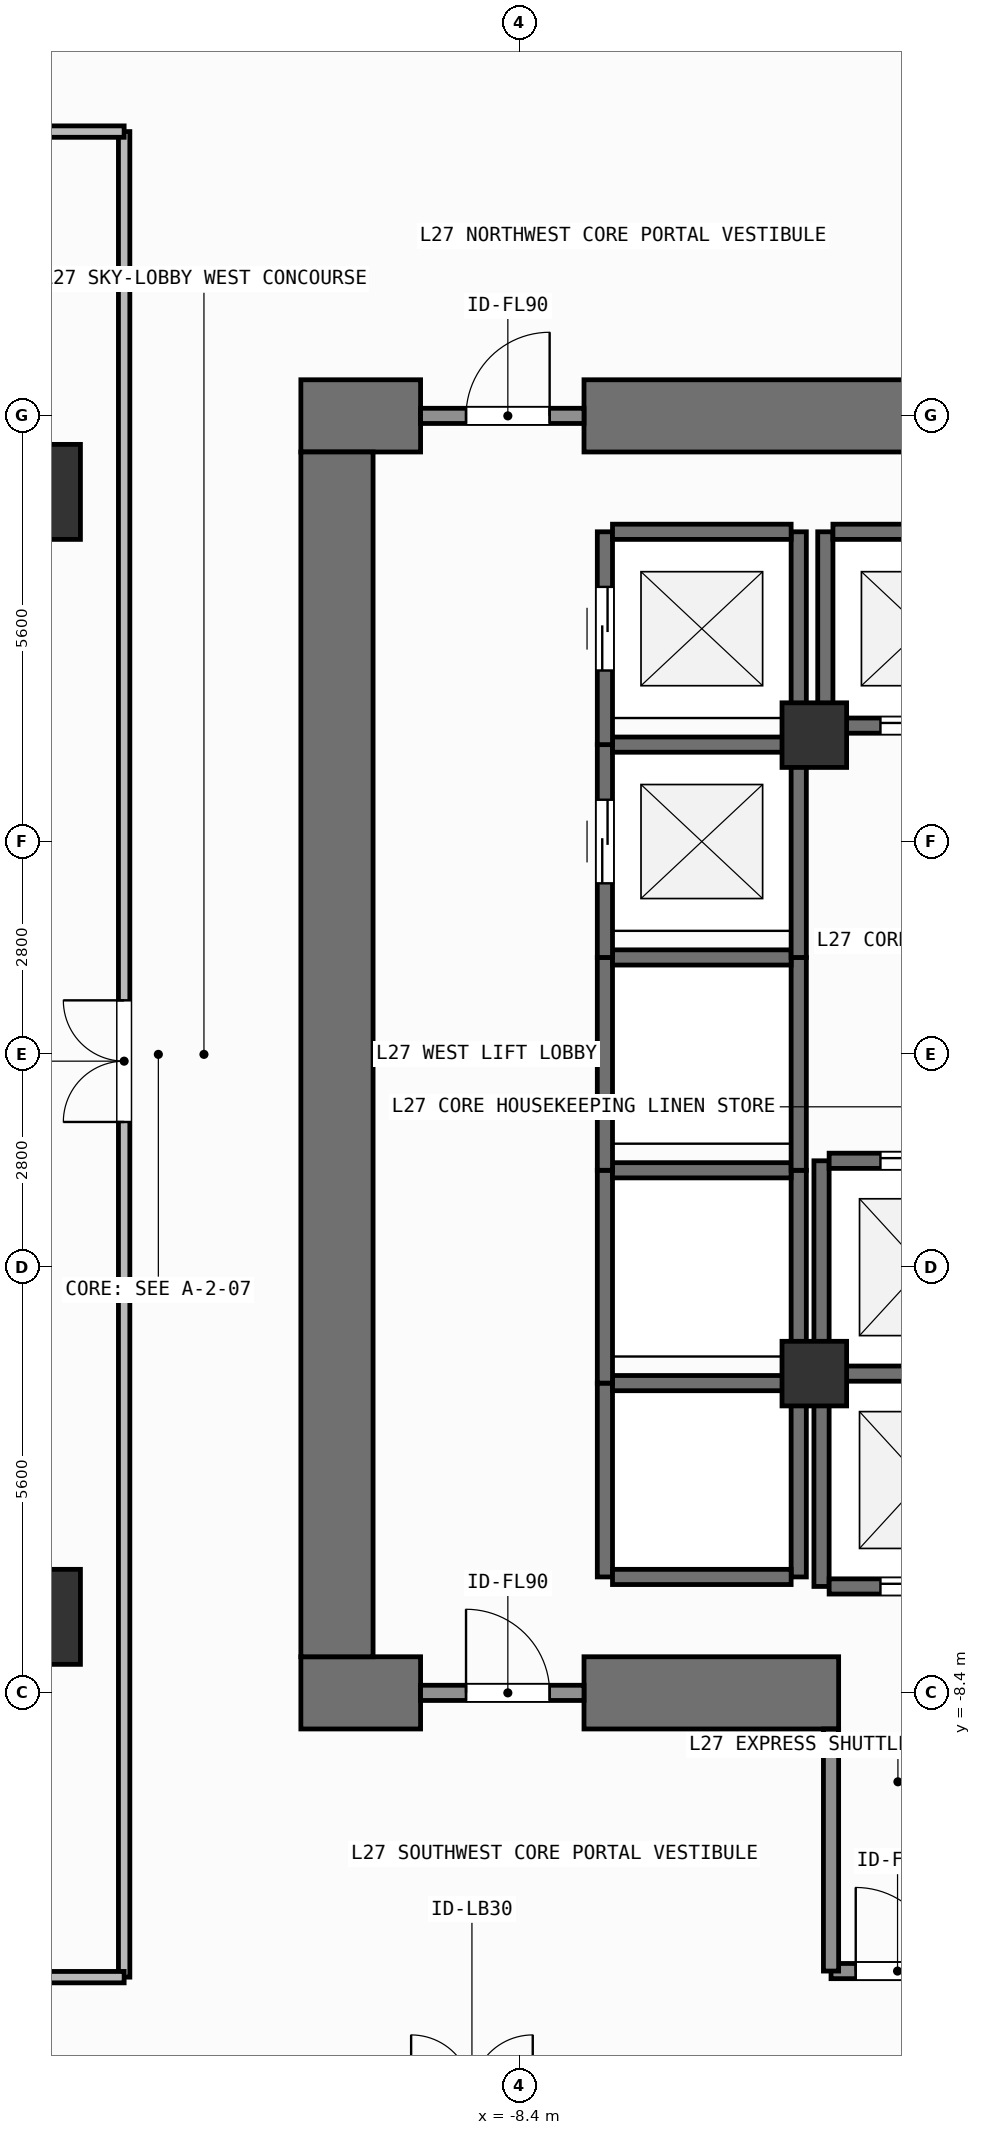
"""IFC4 building model, lengths in metres.
Left out: names, types, materials, properties, quantities, classifications, styles, units other than length and angle.
Written with IfcOpenShell. Run it as: python <this file> out.ifc"""

import sys

from ifc_helpers import new_model, si_unit, direction, frame, frame_2d, origin, origin_2d, place, context, subcontext, project, spatial, rectangle, extrude, element, fill, save


model = new_model("IFC4")
c1 = context("Model", 3, precision=1e-05, world=origin(), true_north=direction((0.0, 1.0)))
c2 = subcontext(c1, "Body", "Model", "MODEL_VIEW")
j1 = project(units=[si_unit("LENGTHUNIT", "METRE"), si_unit("PLANEANGLEUNIT", "RADIAN")], contexts=[c1])
p1 = place(None, origin())
s1 = spatial("IfcSite", under=j1, at=p1, CompositionType="ELEMENT")
p2 = place(p1, origin())
s2 = spatial("IfcBuilding", under=s1, at=p2, CompositionType="ELEMENT")
p3 = place(p2, frame((0.0, 0.0, 108.6)))
s3 = spatial("IfcBuildingStorey", under=s2, at=p3, CompositionType="ELEMENT", Elevation=108.6)
p4 = place(p3, frame((-11.275, -8.4, 0.0), z_axis=(0.0, 0.0, 1.0), x_axis=(1.0, 0.0, 0.0)))
e1 = element("IfcWall", 1, at=p4, inside=s3, PredefinedType="SHEAR", context=c2, shape_type="SweptSolid", body=[
    extrude(rectangle(XDim=1.575, YDim=0.95, at=frame_2d((0.788, 0.0))), origin(), (0.0, 0.0, 1.0), 4.8),
])
p5 = place(p3, frame((-7.55, -8.4, 0.0), z_axis=(0.0, 0.0, 1.0), x_axis=(1.0, 0.0, 0.0)))
e2 = element("IfcWall", 2, at=p5, inside=s3, PredefinedType="SHEAR", context=c2, shape_type="SweptSolid", body=[
    extrude(rectangle(XDim=3.35, YDim=0.95, at=frame_2d((1.675, 0.0))), origin(), (0.0, 0.0, 1.0), 4.8),
])
p6 = place(p3, frame((-11.275, 8.4, 0.0), z_axis=(0.0, 0.0, 1.0), x_axis=(1.0, 0.0, 0.0)))
e3 = element("IfcWall", 3, at=p6, inside=s3, PredefinedType="SHEAR", context=c2, shape_type="SweptSolid", body=[
    extrude(rectangle(XDim=1.575, YDim=0.95, at=frame_2d((0.788, 0.0))), origin(), (0.0, 0.0, 1.0), 4.8),
])
p7 = place(p3, frame((-7.55, 8.4, 0.0), z_axis=(0.0, 0.0, 1.0), x_axis=(1.0, 0.0, 0.0)))
e4 = element("IfcWall", 4, at=p7, inside=s3, PredefinedType="SHEAR", context=c2, shape_type="SweptSolid", body=[
    extrude(rectangle(XDim=16.425, YDim=0.95, at=frame_2d((8.212, 0.0))), origin(), (0.0, 0.0, 1.0), 4.8),
])
p8 = place(p3, frame((-10.8, -7.925, 0.0), z_axis=(0.0, 0.0, 1.0), x_axis=(0.0, 1.0, 0.0)))
e5 = element("IfcWall", 5, at=p8, inside=s3, PredefinedType="SHEAR", context=c2, shape_type="SweptSolid", body=[
    extrude(rectangle(XDim=15.85, YDim=0.95, at=frame_2d((7.925, 0.0))), origin(), (0.0, 0.0, 1.0), 4.8),
])
for number, where, z_axis, x_axis in (
    (6, (-14.8, -7.4, 0.0), (0.0, 0.0, 1.0), (1.0, 0.0, 0.0)),
    (7, (-14.8, 7.4, 0.0), (0.0, 0.0, 1.0), (1.0, 0.0, 0.0)),
):
    element("IfcColumn", number, at=place(p3, frame(where, z_axis=z_axis, x_axis=x_axis)), inside=s3, PredefinedType="COLUMN", context=c2, shape_type="SweptSolid", body=[
        extrude(rectangle(XDim=1.25, YDim=1.25, at=origin_2d()), origin(), (0.0, 0.0, 1.0), 4.8),
    ])
for number, where, z_axis, x_axis in (
    (8, (-4.52, -4.2, 0.0), (0.0, 0.0, 1.0), (1.0, 0.0, 0.0)),
    (9, (-4.52, 4.2, 0.0), (0.0, 0.0, 1.0), (1.0, 0.0, 0.0)),
):
    element("IfcColumn", number, at=place(p3, frame(where, z_axis=z_axis, x_axis=x_axis)), inside=s3, PredefinedType="COLUMN", context=c2, shape_type="SweptSolid", body=[
        extrude(rectangle(XDim=0.85, YDim=0.85, at=origin_2d()), origin(), (0.0, 0.0, 1.0), 4.8),
    ])
for number, where, z_axis, x_axis in (
    (10, (-7.275, -6.875, 0.0), (0.0, 0.0, 1.0), (0.0, 1.0, 0.0)),
    (11, (-4.725, -6.875, 0.0), (0.0, 0.0, 1.0), (0.0, 1.0, 0.0)),
):
    element("IfcWall", number, at=place(p3, frame(where, z_axis=z_axis, x_axis=x_axis)), inside=s3, PredefinedType="SHEAR", context=c2, shape_type="SweptSolid", body=[
        extrude(rectangle(XDim=2.55, YDim=0.2, at=frame_2d((1.275, 0.0))), origin(), (0.0, 0.0, 1.0), 4.58),
    ])
for number, where, z_axis, x_axis in (
    (12, (-7.175, -6.875, 0.0), (0.0, 0.0, 1.0), (1.0, 0.0, 0.0)),
    (13, (-7.175, -4.325, 0.0), (0.0, 0.0, 1.0), (1.0, 0.0, 0.0)),
):
    element("IfcWall", number, at=place(p3, frame(where, z_axis=z_axis, x_axis=x_axis)), inside=s3, PredefinedType="SHEAR", context=c2, shape_type="SweptSolid", body=[
        extrude(rectangle(XDim=2.35, YDim=0.2, at=frame_2d((1.175, 0.0))), origin(), (0.0, 0.0, 1.0), 4.58),
    ])
for number, where, z_axis, x_axis in (
    (14, (-7.275, -4.325, 0.0), (0.0, 0.0, 1.0), (0.0, 1.0, 0.0)),
    (15, (-4.725, -4.325, 0.0), (0.0, 0.0, 1.0), (0.0, 1.0, 0.0)),
):
    element("IfcWall", number, at=place(p3, frame(where, z_axis=z_axis, x_axis=x_axis)), inside=s3, PredefinedType="SHEAR", context=c2, shape_type="SweptSolid", body=[
        extrude(rectangle(XDim=2.8, YDim=0.2, at=frame_2d((1.4, 0.0))), origin(), (0.0, 0.0, 1.0), 4.58),
    ])
p9 = place(p3, frame((-7.175, -1.525, 0.0), z_axis=(0.0, 0.0, 1.0), x_axis=(1.0, 0.0, 0.0)))
e16 = element("IfcWall", 16, at=p9, inside=s3, PredefinedType="SHEAR", context=c2, shape_type="SweptSolid", body=[
    extrude(rectangle(XDim=2.35, YDim=0.2, at=frame_2d((1.175, 0.0))), origin(), (0.0, 0.0, 1.0), 4.58),
])
for number, where, z_axis, x_axis in (
    (17, (-7.275, -1.525, 0.0), (0.0, 0.0, 1.0), (0.0, 1.0, 0.0)),
    (18, (-4.725, -1.525, 0.0), (0.0, 0.0, 1.0), (0.0, 1.0, 0.0)),
):
    element("IfcWall", number, at=place(p3, frame(where, z_axis=z_axis, x_axis=x_axis)), inside=s3, PredefinedType="SHEAR", context=c2, shape_type="SweptSolid", body=[
        extrude(rectangle(XDim=2.8, YDim=0.2, at=frame_2d((1.4, 0.0))), origin(), (0.0, 0.0, 1.0), 4.58),
    ])
p10 = place(p3, frame((-7.175, 1.275, 0.0), z_axis=(0.0, 0.0, 1.0), x_axis=(1.0, 0.0, 0.0)))
e19 = element("IfcWall", 19, at=p10, inside=s3, PredefinedType="SHEAR", context=c2, shape_type="SweptSolid", body=[
    extrude(rectangle(XDim=2.35, YDim=0.2, at=frame_2d((1.175, 0.0))), origin(), (0.0, 0.0, 1.0), 4.58),
])
p11 = place(p3, frame((-7.275, 1.275, 0.0), z_axis=(0.0, 0.0, 1.0), x_axis=(0.0, 1.0, 0.0)))
e20 = element("IfcWall", 20, at=p11, inside=s3, PredefinedType="SHEAR", context=c2, shape_type="SweptSolid", body=[
    extrude(rectangle(XDim=2.8, YDim=0.2, at=frame_2d((1.4, 0.0))), origin(), (0.0, 0.0, 1.0), 4.58),
])
p12 = place(p11, frame((0.975, 0.0, 0.0)))
e21 = element("IfcOpeningElement", 21, at=p12, cuts=e20, PredefinedType="OPENING", context=c2, shape_type="SweptSolid", body=[
    extrude(rectangle(XDim=1.1, YDim=2.2, at=frame_2d((0.55, 1.1))), frame((0.0, 0.11, 0.0), z_axis=(0.0, -1.0, 0.0), x_axis=(1.0, 0.0, 0.0)), (0.0, 0.0, 1.0), 0.22),
])
p13 = place(p3, frame((-4.725, 1.275, 0.0), z_axis=(0.0, 0.0, 1.0), x_axis=(0.0, 1.0, 0.0)))
e22 = element("IfcWall", 22, at=p13, inside=s3, PredefinedType="SHEAR", context=c2, shape_type="SweptSolid", body=[
    extrude(rectangle(XDim=2.8, YDim=0.2, at=frame_2d((1.4, 0.0))), origin(), (0.0, 0.0, 1.0), 4.58),
])
p14 = place(p3, frame((-7.175, 4.075, 0.0), z_axis=(0.0, 0.0, 1.0), x_axis=(1.0, 0.0, 0.0)))
e23 = element("IfcWall", 23, at=p14, inside=s3, PredefinedType="SHEAR", context=c2, shape_type="SweptSolid", body=[
    extrude(rectangle(XDim=2.35, YDim=0.2, at=frame_2d((1.175, 0.0))), origin(), (0.0, 0.0, 1.0), 4.58),
])
p15 = place(p3, frame((-7.275, 4.075, 0.0), z_axis=(0.0, 0.0, 1.0), x_axis=(0.0, 1.0, 0.0)))
e24 = element("IfcWall", 24, at=p15, inside=s3, PredefinedType="SHEAR", context=c2, shape_type="SweptSolid", body=[
    extrude(rectangle(XDim=2.8, YDim=0.2, at=frame_2d((1.4, 0.0))), origin(), (0.0, 0.0, 1.0), 4.58),
])
p16 = place(p15, frame((0.975, 0.0, 0.0)))
e25 = element("IfcOpeningElement", 25, at=p16, cuts=e24, PredefinedType="OPENING", context=c2, shape_type="SweptSolid", body=[
    extrude(rectangle(XDim=1.1, YDim=2.2, at=frame_2d((0.55, 1.1))), frame((0.0, 0.11, 0.0), z_axis=(0.0, -1.0, 0.0), x_axis=(1.0, 0.0, 0.0)), (0.0, 0.0, 1.0), 0.22),
])
p17 = place(p3, frame((-4.725, 4.075, 0.0), z_axis=(0.0, 0.0, 1.0), x_axis=(0.0, 1.0, 0.0)))
e26 = element("IfcWall", 26, at=p17, inside=s3, PredefinedType="SHEAR", context=c2, shape_type="SweptSolid", body=[
    extrude(rectangle(XDim=2.8, YDim=0.2, at=frame_2d((1.4, 0.0))), origin(), (0.0, 0.0, 1.0), 4.58),
])
p18 = place(p3, frame((-7.175, 6.875, 0.0), z_axis=(0.0, 0.0, 1.0), x_axis=(1.0, 0.0, 0.0)))
e27 = element("IfcWall", 27, at=p18, inside=s3, PredefinedType="SHEAR", context=c2, shape_type="SweptSolid", body=[
    extrude(rectangle(XDim=2.35, YDim=0.2, at=frame_2d((1.175, 0.0))), origin(), (0.0, 0.0, 1.0), 4.58),
])
p19 = place(p3, frame((-4.375, 4.325, 0.0), z_axis=(0.0, 0.0, 1.0), x_axis=(0.0, 1.0, 0.0)))
e28 = element("IfcWall", 28, at=p19, inside=s3, PredefinedType="SHEAR", context=c2, shape_type="SweptSolid", body=[
    extrude(rectangle(XDim=2.55, YDim=0.2, at=frame_2d((1.275, 0.0))), origin(), (0.0, 0.0, 1.0), 4.58),
])
p20 = place(p3, frame((-4.275, 4.325, 0.0), z_axis=(0.0, 0.0, 1.0), x_axis=(1.0, 0.0, 0.0)))
e29 = element("IfcWall", 29, at=p20, inside=s3, PredefinedType="SHEAR", context=c2, shape_type="SweptSolid", body=[
    extrude(rectangle(XDim=2.35, YDim=0.2, at=frame_2d((1.175, 0.0))), origin(), (0.0, 0.0, 1.0), 4.58),
])
p21 = place(p20, frame((0.625, 0.0, 0.0)))
e30 = element("IfcOpeningElement", 30, at=p21, cuts=e29, PredefinedType="OPENING", context=c2, shape_type="SweptSolid", body=[
    extrude(rectangle(XDim=1.1, YDim=2.2, at=frame_2d((0.55, 1.1))), frame((0.0, 0.11, 0.0), z_axis=(0.0, -1.0, 0.0), x_axis=(1.0, 0.0, 0.0)), (0.0, 0.0, 1.0), 0.22),
])
p22 = place(p3, frame((-4.275, 6.875, 0.0), z_axis=(0.0, 0.0, 1.0), x_axis=(1.0, 0.0, 0.0)))
e31 = element("IfcWall", 31, at=p22, inside=s3, PredefinedType="SHEAR", context=c2, shape_type="SweptSolid", body=[
    extrude(rectangle(XDim=2.35, YDim=0.2, at=frame_2d((1.175, 0.0))), origin(), (0.0, 0.0, 1.0), 4.58),
])
p23 = place(p3, frame((-4.425, -7.0, 0.0), z_axis=(0.0, 0.0, 1.0), x_axis=(0.0, 1.0, 0.0)))
e32 = element("IfcWall", 32, at=p23, inside=s3, PredefinedType="SHEAR", context=c2, shape_type="SweptSolid", body=[
    extrude(rectangle(XDim=2.8, YDim=0.2, at=frame_2d((1.4, 0.0))), origin(), (0.0, 0.0, 1.0), 4.58),
])
p24 = place(p3, frame((-4.325, -7.0, 0.0), z_axis=(0.0, 0.0, 1.0), x_axis=(1.0, 0.0, 0.0)))
e33 = element("IfcWall", 33, at=p24, inside=s3, PredefinedType="SHEAR", context=c2, shape_type="SweptSolid", body=[
    extrude(rectangle(XDim=2.45, YDim=0.2, at=frame_2d((1.225, 0.0))), origin(), (0.0, 0.0, 1.0), 4.58),
])
p25 = place(p24, frame((0.675, 0.0, 0.0)))
e34 = element("IfcOpeningElement", 34, at=p25, cuts=e33, PredefinedType="OPENING", context=c2, shape_type="SweptSolid", body=[
    extrude(rectangle(XDim=1.1, YDim=2.2, at=frame_2d((0.55, 1.1))), frame((0.0, 0.11, 0.0), z_axis=(0.0, -1.0, 0.0), x_axis=(1.0, 0.0, 0.0)), (0.0, 0.0, 1.0), 0.22),
])
p26 = place(p3, frame((-4.325, -4.2, 0.0), z_axis=(0.0, 0.0, 1.0), x_axis=(1.0, 0.0, 0.0)))
e35 = element("IfcWall", 35, at=p26, inside=s3, PredefinedType="SHEAR", context=c2, shape_type="SweptSolid", body=[
    extrude(rectangle(XDim=2.45, YDim=0.2, at=frame_2d((1.225, 0.0))), origin(), (0.0, 0.0, 1.0), 4.58),
])
p27 = place(p3, frame((-4.425, -4.2, 0.0), z_axis=(0.0, 0.0, 1.0), x_axis=(0.0, 1.0, 0.0)))
e36 = element("IfcWall", 36, at=p27, inside=s3, PredefinedType="SHEAR", context=c2, shape_type="SweptSolid", body=[
    extrude(rectangle(XDim=2.8, YDim=0.2, at=frame_2d((1.4, 0.0))), origin(), (0.0, 0.0, 1.0), 4.58),
])
p28 = place(p3, frame((-4.325, -1.4, 0.0), z_axis=(0.0, 0.0, 1.0), x_axis=(1.0, 0.0, 0.0)))
e37 = element("IfcWall", 37, at=p28, inside=s3, PredefinedType="SHEAR", context=c2, shape_type="SweptSolid", body=[
    extrude(rectangle(XDim=2.45, YDim=0.2, at=frame_2d((1.225, 0.0))), origin(), (0.0, 0.0, 1.0), 4.58),
])
p29 = place(p28, frame((0.675, 0.0, 0.0)))
e38 = element("IfcOpeningElement", 38, at=p29, cuts=e37, PredefinedType="OPENING", context=c2, shape_type="SweptSolid", body=[
    extrude(rectangle(XDim=1.1, YDim=2.2, at=frame_2d((0.55, 1.1))), frame((0.0, 0.11, 0.0), z_axis=(0.0, -1.0, 0.0), x_axis=(1.0, 0.0, 0.0)), (0.0, 0.0, 1.0), 0.22),
])
p30 = place(p3, frame((-9.7, -8.4, 0.0), z_axis=(0.0, 0.0, 1.0), x_axis=(1.0, 0.0, 0.0)))
e39 = element("IfcWall", 39, at=p30, inside=s3, PredefinedType="SOLIDWALL", context=c2, shape_type="SweptSolid", body=[
    extrude(rectangle(XDim=2.15, YDim=0.2, at=frame_2d((1.075, 0.0))), origin(), (0.0, 0.0, 1.0), 3.62),
])
p31 = place(p30, frame((0.598, 0.0, 0.0)))
e40 = element("IfcOpeningElement", 40, at=p31, cuts=e39, PredefinedType="OPENING", context=c2, shape_type="SweptSolid", body=[
    extrude(rectangle(XDim=1.1, YDim=2.15, at=frame_2d((0.55, 1.075))), frame((0.0, 0.11, 0.0), z_axis=(0.0, -1.0, 0.0), x_axis=(1.0, 0.0, 0.0)), (0.0, 0.0, 1.0), 0.22),
])
p32 = place(p3, frame((-9.7, 8.4, 0.0), z_axis=(0.0, 0.0, 1.0), x_axis=(1.0, 0.0, 0.0)))
e41 = element("IfcWall", 41, at=p32, inside=s3, PredefinedType="SOLIDWALL", context=c2, shape_type="SweptSolid", body=[
    extrude(rectangle(XDim=2.15, YDim=0.2, at=frame_2d((1.075, 0.0))), origin(), (0.0, 0.0, 1.0), 3.62),
])
p33 = place(p32, frame((0.598, 0.0, 0.0)))
e42 = element("IfcOpeningElement", 42, at=p33, cuts=e41, PredefinedType="OPENING", context=c2, shape_type="SweptSolid", body=[
    extrude(rectangle(XDim=1.1, YDim=2.15, at=frame_2d((0.55, 1.075))), frame((0.0, 0.11, 0.0), z_axis=(0.0, -1.0, 0.0), x_axis=(1.0, 0.0, 0.0)), (0.0, 0.0, 1.0), 0.22),
])
p34 = place(p3, frame((-4.3, -12.06, 0.0), z_axis=(0.0, 0.0, 1.0), x_axis=(1.0, 0.0, 0.0)))
e43 = element("IfcWall", 43, at=p34, inside=s3, PredefinedType="SOLIDWALL", context=c2, shape_type="SweptSolid", body=[
    extrude(rectangle(XDim=1.75, YDim=0.2, at=frame_2d((0.875, 0.0))), origin(), (0.0, 0.0, 1.0), 4.58),
])
p35 = place(p34, frame((0.325, 0.0, 0.0)))
e44 = element("IfcOpeningElement", 44, at=p35, cuts=e43, PredefinedType="OPENING", context=c2, shape_type="SweptSolid", body=[
    extrude(rectangle(XDim=1.1, YDim=2.15, at=frame_2d((0.55, 1.075))), frame((0.0, 0.11, 0.0), z_axis=(0.0, -1.0, 0.0), x_axis=(1.0, 0.0, 0.0)), (0.0, 0.0, 1.0), 0.22),
])
p36 = place(p3, frame((-13.6, -12.14, 0.0), z_axis=(0.0, 0.0, 1.0), x_axis=(0.0, 1.0, 0.0)))
e45 = element("IfcWall", 45, at=p36, inside=s3, PredefinedType="PARTITIONING", context=c2, shape_type="SweptSolid", body=[
    extrude(rectangle(XDim=24.28, YDim=0.15, at=frame_2d((12.14, 0.0))), origin(), (0.0, 0.0, 1.0), 4.58),
])
p37 = place(p36, frame((11.25, 0.0, 0.0)))
e46 = element("IfcOpeningElement", 46, at=p37, cuts=e45, PredefinedType="OPENING", context=c2, shape_type="SweptSolid", body=[
    extrude(rectangle(XDim=1.6, YDim=2.3, at=frame_2d((0.8, 1.15))), frame((0.0, 0.085, 0.0), z_axis=(0.0, -1.0, 0.0), x_axis=(1.0, 0.0, 0.0)), (0.0, 0.0, 1.0), 0.17),
])
p38 = place(p3, frame((-4.3, -12.06, 0.0), z_axis=(0.0, 0.0, 1.0), x_axis=(0.0, 1.0, 0.0)))
e47 = element("IfcWall", 47, at=p38, inside=s3, PredefinedType="SOLIDWALL", context=c2, shape_type="SweptSolid", body=[
    extrude(rectangle(XDim=3.185, YDim=0.2, at=frame_2d((1.593, 0.0))), origin(), (0.0, 0.0, 1.0), 4.58),
])
for number, where, z_axis, x_axis in (
    (48, (-19.73, -12.14, 0.0), (0.0, 0.0, 1.0), (1.0, 0.0, 0.0)),
    (49, (-19.73, 12.14, 0.0), (0.0, 0.0, 1.0), (1.0, 0.0, 0.0)),
):
    element("IfcWall", number, at=place(p3, frame(where, z_axis=z_axis, x_axis=x_axis)), inside=s3, PredefinedType="PARTITIONING", context=c2, shape_type="SweptSolid", body=[
        extrude(rectangle(XDim=6.13, YDim=0.15, at=frame_2d((3.065, 0.0))), origin(), (0.0, 0.0, 1.0), 4.58),
    ])
p39 = place(p12, origin())
e50 = element("IfcDoor", 50, at=p39, inside=s3, OperationType="SLIDING_TO_LEFT", PredefinedType="DOOR", context=c2, shape_type="SweptSolid", body=[
    extrude(rectangle(XDim=1.1, YDim=2.2, at=frame_2d((0.55, 1.1))), frame((0.0, 0.025, 0.0), z_axis=(0.0, -1.0, 0.0), x_axis=(1.0, 0.0, 0.0)), (0.0, 0.0, 1.0), 0.05),
])
fill(e21, e50)
p40 = place(p16, origin())
e51 = element("IfcDoor", 51, at=p40, inside=s3, OperationType="SLIDING_TO_LEFT", PredefinedType="DOOR", context=c2, shape_type="SweptSolid", body=[
    extrude(rectangle(XDim=1.1, YDim=2.2, at=frame_2d((0.55, 1.1))), frame((0.0, 0.025, 0.0), z_axis=(0.0, -1.0, 0.0), x_axis=(1.0, 0.0, 0.0)), (0.0, 0.0, 1.0), 0.05),
])
fill(e25, e51)
p41 = place(p21, origin())
e52 = element("IfcDoor", 52, at=p41, inside=s3, OperationType="SLIDING_TO_LEFT", PredefinedType="DOOR", context=c2, shape_type="SweptSolid", body=[
    extrude(rectangle(XDim=1.1, YDim=2.2, at=frame_2d((0.55, 1.1))), frame((0.0, 0.025, 0.0), z_axis=(0.0, -1.0, 0.0), x_axis=(1.0, 0.0, 0.0)), (0.0, 0.0, 1.0), 0.05),
])
fill(e30, e52)
p42 = place(p25, origin())
e53 = element("IfcDoor", 53, at=p42, inside=s3, OperationType="SLIDING_TO_LEFT", PredefinedType="DOOR", context=c2, shape_type="SweptSolid", body=[
    extrude(rectangle(XDim=1.1, YDim=2.2, at=frame_2d((0.55, 1.1))), frame((0.0, 0.025, 0.0), z_axis=(0.0, -1.0, 0.0), x_axis=(1.0, 0.0, 0.0)), (0.0, 0.0, 1.0), 0.05),
])
fill(e34, e53)
p43 = place(p29, origin())
e54 = element("IfcDoor", 54, at=p43, inside=s3, OperationType="SLIDING_TO_LEFT", PredefinedType="DOOR", context=c2, shape_type="SweptSolid", body=[
    extrude(rectangle(XDim=1.1, YDim=2.2, at=frame_2d((0.55, 1.1))), frame((0.0, 0.025, 0.0), z_axis=(0.0, -1.0, 0.0), x_axis=(1.0, 0.0, 0.0)), (0.0, 0.0, 1.0), 0.05),
])
fill(e38, e54)
p44 = place(p31, origin())
e55 = element("IfcDoor", 55, at=p44, inside=s3, OperationType="SINGLE_SWING_LEFT", PredefinedType="DOOR", context=c2, shape_type="SweptSolid", body=[
    extrude(rectangle(XDim=1.1, YDim=2.15, at=frame_2d((0.55, 1.075))), frame((0.0, 0.025, 0.0), z_axis=(0.0, -1.0, 0.0), x_axis=(1.0, 0.0, 0.0)), (0.0, 0.0, 1.0), 0.05),
])
fill(e40, e55)
p45 = place(p33, origin())
e56 = element("IfcDoor", 56, at=p45, inside=s3, OperationType="SINGLE_SWING_RIGHT", PredefinedType="DOOR", context=c2, shape_type="SweptSolid", body=[
    extrude(rectangle(XDim=1.1, YDim=2.15, at=frame_2d((0.55, 1.075))), frame((0.0, 0.025, 0.0), z_axis=(0.0, -1.0, 0.0), x_axis=(1.0, 0.0, 0.0)), (0.0, 0.0, 1.0), 0.05),
])
fill(e42, e56)
p46 = place(p35, origin())
e57 = element("IfcDoor", 57, at=p46, inside=s3, OperationType="SINGLE_SWING_LEFT", PredefinedType="DOOR", context=c2, shape_type="SweptSolid", body=[
    extrude(rectangle(XDim=1.1, YDim=2.15, at=frame_2d((0.55, 1.075))), frame((0.0, 0.025, 0.0), z_axis=(0.0, -1.0, 0.0), x_axis=(1.0, 0.0, 0.0)), (0.0, 0.0, 1.0), 0.05),
])
fill(e44, e57)
p47 = place(p37, origin())
e58 = element("IfcDoor", 58, at=p47, inside=s3, OperationType="SINGLE_SWING_LEFT", PredefinedType="DOOR", context=c2, shape_type="SweptSolid", body=[
    extrude(rectangle(XDim=1.6, YDim=2.3, at=frame_2d((0.8, 1.15))), frame((0.0, 0.025, 0.0), z_axis=(0.0, -1.0, 0.0), x_axis=(1.0, 0.0, 0.0)), (0.0, 0.0, 1.0), 0.05),
])
fill(e46, e58)
save(model, sys.argv[1])
